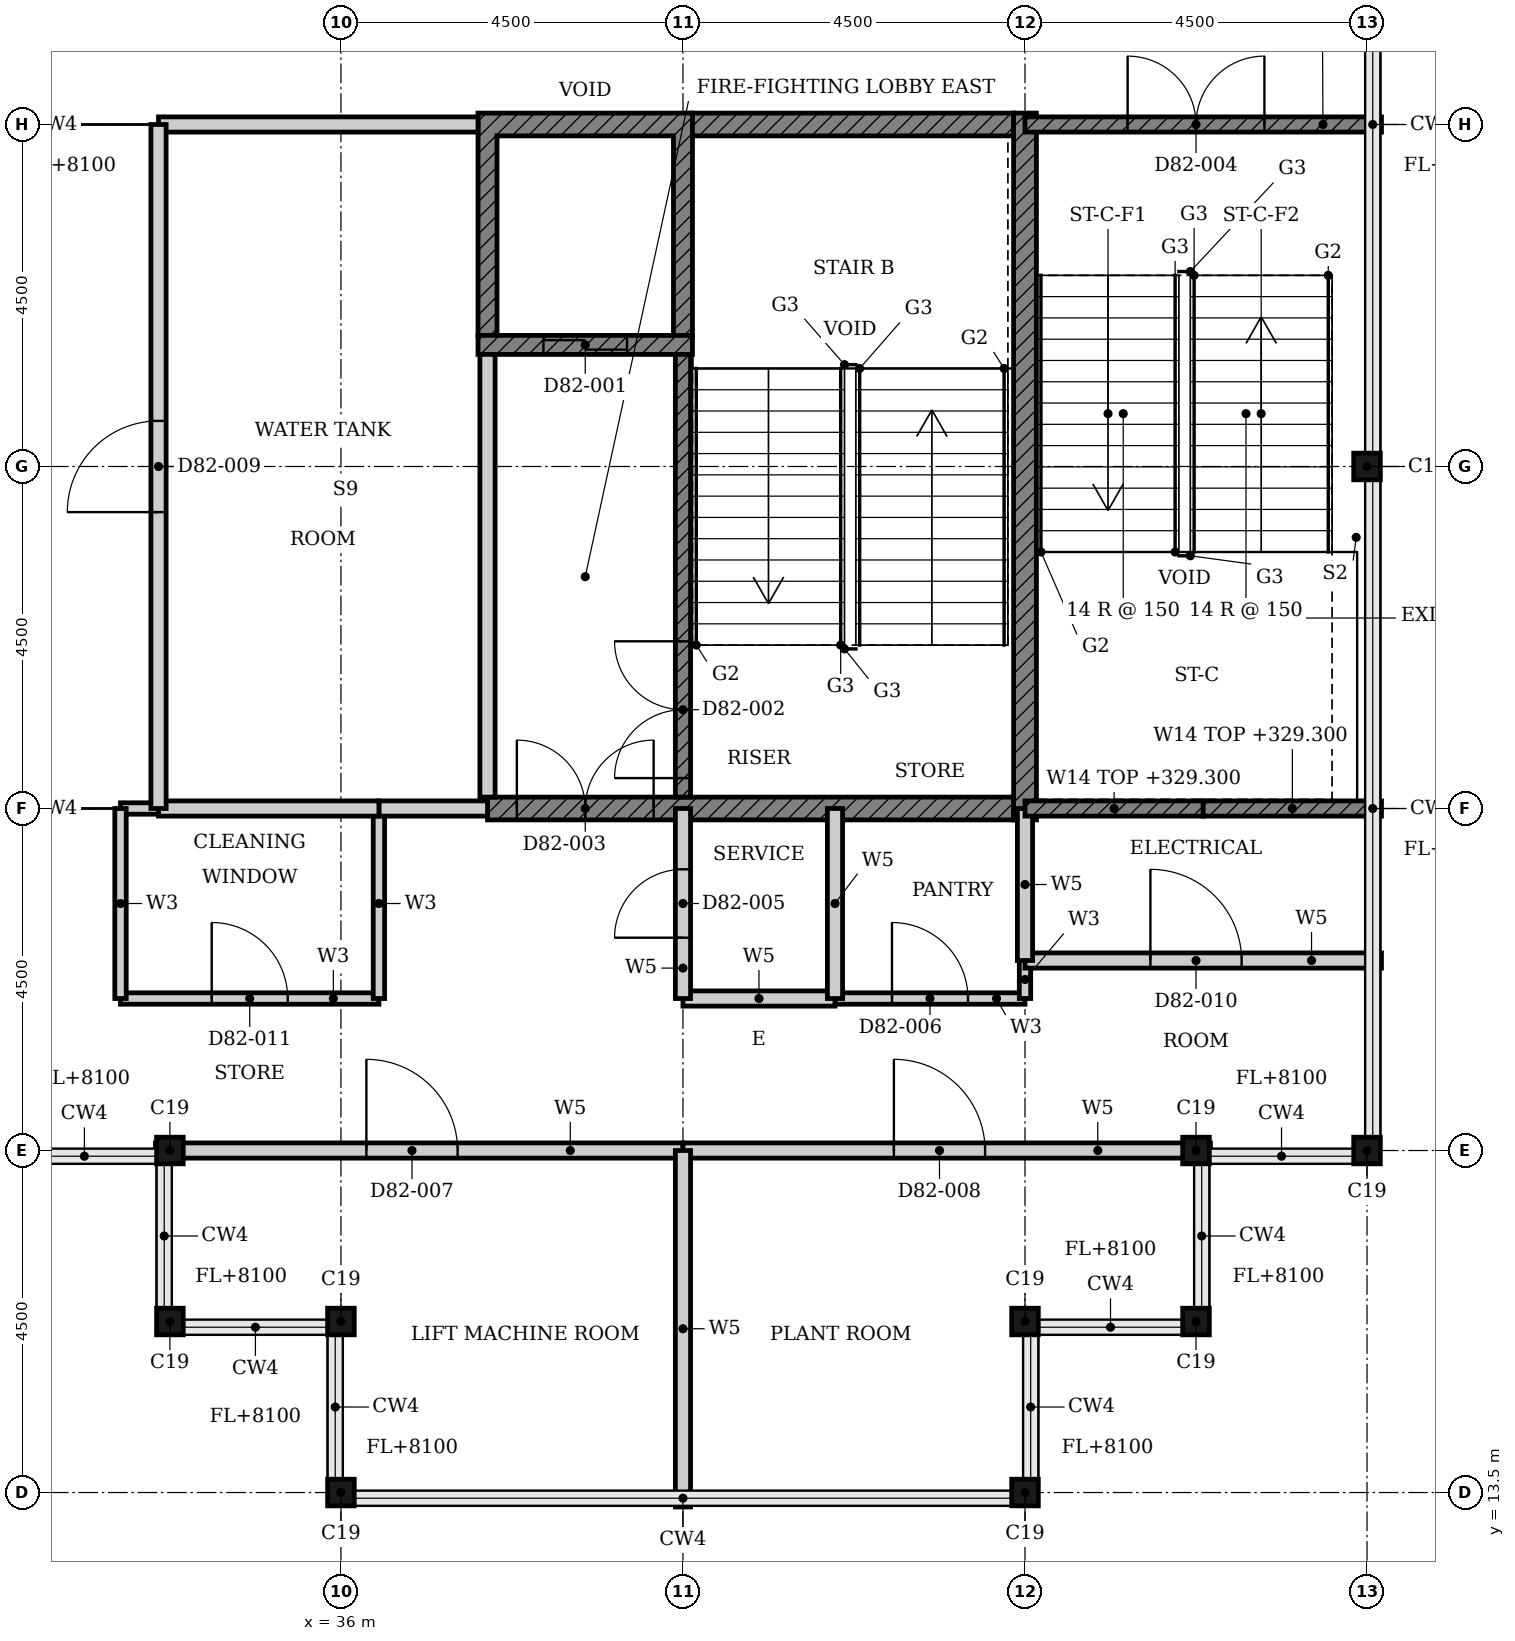
"""IFC4 building model, lengths in metres.
Left out: names, types, materials, properties, quantities, classifications, styles, units other than length and angle.
Written with IfcOpenShell. Run it as: python <this file> out.ifc"""

import sys

from ifc_helpers import new_model, si_unit, direction, frame, frame_2d, origin, origin_2d, place, context, subcontext, project, spatial, polyline, rectangle, i_section, outline, extrude, element, fill, save


model = new_model("IFC4")
c1 = context("Model", 3, precision=1e-05, world=origin(), true_north=direction((0.0, 1.0)))
c2 = subcontext(c1, "Body", "Model", "MODEL_VIEW")
j1 = project(units=[si_unit("LENGTHUNIT", "METRE"), si_unit("PLANEANGLEUNIT", "RADIAN")], contexts=[c1])
p1 = place(None, origin())
s1 = spatial("IfcSite", under=j1, at=p1, CompositionType="ELEMENT")
p2 = place(p1, origin())
s2 = spatial("IfcBuilding", under=s1, at=p2, CompositionType="ELEMENT")
p3 = place(p2, frame((0.0, 0.0, 325.4)))
s3 = spatial("IfcBuildingStorey", under=s2, at=p3, CompositionType="ELEMENT", Elevation=325.4)
for number, where, z_axis, x_axis in (
    (1, (45.0, 13.5, 0.0), (0.0, 0.0, 1.0), (1.0, 0.0, 0.0)),
    (2, (45.0, 15.75, 0.0), (0.0, 0.0, 1.0), (1.0, 0.0, 0.0)),
    (3, (47.25, 15.75, 0.0), (0.0, 0.0, 1.0), (1.0, 0.0, 0.0)),
    (4, (47.25, 18.0, 0.0), (0.0, 0.0, 1.0), (1.0, 0.0, 0.0)),
    (5, (49.5, 18.0, 0.0), (0.0, 0.0, 1.0), (1.0, 0.0, 0.0)),
    (6, (49.5, 27.0, 0.0), (0.0, 0.0, 1.0), (1.0, 0.0, 0.0)),
    (7, (33.75, 18.0, 0.0), (0.0, 0.0, 1.0), (1.0, 0.0, 0.0)),
    (8, (33.75, 15.75, 0.0), (0.0, 0.0, 1.0), (1.0, 0.0, 0.0)),
    (9, (36.0, 15.75, 0.0), (0.0, 0.0, 1.0), (1.0, 0.0, 0.0)),
    (10, (36.0, 13.5, 0.0), (0.0, 0.0, 1.0), (1.0, 0.0, 0.0)),
):
    element("IfcColumn", number, at=place(p3, frame(where, z_axis=z_axis, x_axis=x_axis)), inside=s3, PredefinedType="COLUMN", context=c2, shape_type="SweptSolid", body=[
        extrude(i_section(OverallWidth=0.35, OverallDepth=0.35, WebThickness=0.012, FlangeThickness=0.019, FilletRadius=0.013, at=origin_2d()), origin(), (0.0, 0.0, 1.0), 4.2),
    ])
p4 = place(p3, origin())
e11 = element("IfcWall", 11, at=p4, inside=s3, PredefinedType="SHEAR", context=c2, shape_type="SweptSolid", body=[
    extrude(outline(polyline([(37.803, 28.725), (38.053, 28.725), (38.053, 31.35), (40.375, 31.35), (40.375, 28.725), (40.625, 28.725), (40.625, 31.65), (37.803, 31.65), (37.803, 28.725)])), origin(), (0.0, 0.0, 1.0), 3.9),
])
p5 = place(p3, frame((37.928, 22.5, 0.0), z_axis=(0.0, 0.0, 1.0), x_axis=(1.0, 0.0, 0.0)))
e12 = element("IfcWall", 12, at=p5, inside=s3, PredefinedType="SHEAR", context=c2, shape_type="SweptSolid", body=[
    extrude(rectangle(XDim=6.922, YDim=0.3, at=frame_2d((3.461, 0.0))), origin(), (0.0, 0.0, 1.0), 3.1),
])
p6 = place(p5, frame((0.386, 0.0, 0.0)))
e13 = element("IfcOpeningElement", 13, at=p6, cuts=e12, PredefinedType="OPENING", context=c2, shape_type="SweptSolid", body=[
    extrude(rectangle(XDim=1.8, YDim=2.1, at=frame_2d((0.9, 1.05))), frame((0.0, 0.16, 0.0), z_axis=(0.0, -1.0, 0.0), x_axis=(1.0, 0.0, 0.0)), (0.0, 0.0, 1.0), 0.32),
])
p7 = place(p3, frame((40.625, 31.5, 0.0), z_axis=(0.0, 0.0, 1.0), x_axis=(1.0, 0.0, 0.0)))
e14 = element("IfcWall", 14, at=p7, inside=s3, PredefinedType="SHEAR", context=c2, shape_type="SweptSolid", body=[
    extrude(rectangle(XDim=4.225, YDim=0.3, at=frame_2d((2.113, 0.0))), origin(), (0.0, 0.0, 1.0), 3.1),
])
p8 = place(p3, frame((45.0, 22.35, 0.0), z_axis=(0.0, 0.0, 1.0), x_axis=(0.0, 1.0, 0.0)))
e15 = element("IfcWall", 15, at=p8, inside=s3, PredefinedType="SHEAR", context=c2, shape_type="SweptSolid", body=[
    extrude(rectangle(XDim=9.3, YDim=0.3, at=frame_2d((4.65, 0.0))), origin(), (0.0, 0.0, 1.0), 3.9),
])
p9 = place(p3, frame((37.803, 28.6, 0.0), z_axis=(0.0, 0.0, 1.0), x_axis=(1.0, 0.0, 0.0)))
e16 = element("IfcWall", 16, at=p9, inside=s3, PredefinedType="SHEAR", context=c2, shape_type="SweptSolid", body=[
    extrude(rectangle(XDim=2.822, YDim=0.25, at=frame_2d((1.411, 0.0))), origin(), (0.0, 0.0, 1.0), 3.9),
])
p10 = place(p9, frame((0.861, 0.0, 0.0)))
e17 = element("IfcOpeningElement", 17, at=p10, cuts=e16, PredefinedType="OPENING", context=c2, shape_type="SweptSolid", body=[
    extrude(rectangle(XDim=1.1, YDim=2.1, at=frame_2d((0.55, 1.05))), frame((0.0, 0.135, 0.0), z_axis=(0.0, -1.0, 0.0), x_axis=(1.0, 0.0, 0.0)), (0.0, 0.0, 1.0), 0.27),
])
p11 = place(p3, frame((40.5, 22.65, 0.0), z_axis=(0.0, 0.0, 1.0), x_axis=(0.0, 1.0, 0.0)))
e18 = element("IfcWall", 18, at=p11, inside=s3, PredefinedType="SHEAR", context=c2, shape_type="SweptSolid", body=[
    extrude(rectangle(XDim=5.825, YDim=0.2, at=frame_2d((2.913, 0.0))), origin(), (0.0, 0.0, 1.0), 3.9),
])
p12 = place(p11, frame((0.25, 0.0, 0.0)))
e19 = element("IfcOpeningElement", 19, at=p12, cuts=e18, PredefinedType="OPENING", context=c2, shape_type="SweptSolid", body=[
    extrude(rectangle(XDim=1.8, YDim=2.1, at=frame_2d((0.9, 1.05))), frame((0.0, 0.11, 0.0), z_axis=(0.0, -1.0, 0.0), x_axis=(1.0, 0.0, 0.0)), (0.0, 0.0, 1.0), 0.22),
])
p13 = place(p3, frame((37.928, 22.65, 0.0), z_axis=(0.0, 0.0, 1.0), x_axis=(0.0, 1.0, 0.0)))
e20 = element("IfcWall", 20, at=p13, inside=s3, PredefinedType="PARTITIONING", context=c2, shape_type="SweptSolid", body=[
    extrude(rectangle(XDim=5.825, YDim=0.2, at=frame_2d((2.913, 0.0))), origin(), (0.0, 0.0, 1.0), 3.9),
])
p14 = place(p3, frame((42.5, 20.0, 0.0), z_axis=(0.0, 0.0, 1.0), x_axis=(1.0, 0.0, 0.0)))
e21 = element("IfcWall", 21, at=p14, inside=s3, PredefinedType="PARTITIONING", context=c2, shape_type="SweptSolid", body=[
    extrude(rectangle(XDim=2.5, YDim=0.15, at=frame_2d((1.25, 0.0))), origin(), (0.0, 0.0, 1.0), 3.9),
])
p15 = place(p14, frame((0.75, 0.0, 0.0)))
e22 = element("IfcOpeningElement", 22, at=p15, cuts=e21, PredefinedType="OPENING", context=c2, shape_type="SweptSolid", body=[
    extrude(rectangle(XDim=1.0, YDim=2.1, at=frame_2d((0.5, 1.05))), frame((0.0, 0.085, 0.0), z_axis=(0.0, -1.0, 0.0), x_axis=(1.0, 0.0, 0.0)), (0.0, 0.0, 1.0), 0.17),
])
p16 = place(p3, frame((33.1, 20.0, 0.0), z_axis=(0.0, 0.0, 1.0), x_axis=(1.0, 0.0, 0.0)))
e23 = element("IfcWall", 23, at=p16, inside=s3, PredefinedType="PARTITIONING", context=c2, shape_type="SweptSolid", body=[
    extrude(rectangle(XDim=3.4, YDim=0.15, at=frame_2d((1.7, 0.0))), origin(), (0.0, 0.0, 1.0), 3.9),
])
p17 = place(p16, frame((1.2, 0.0, 0.0)))
e24 = element("IfcOpeningElement", 24, at=p17, cuts=e23, PredefinedType="OPENING", context=c2, shape_type="SweptSolid", body=[
    extrude(rectangle(XDim=1.0, YDim=2.1, at=frame_2d((0.5, 1.05))), frame((0.0, 0.085, 0.0), z_axis=(0.0, -1.0, 0.0), x_axis=(1.0, 0.0, 0.0)), (0.0, 0.0, 1.0), 0.17),
])
p18 = place(p3, frame((33.1, 22.5, 0.0), z_axis=(0.0, 0.0, 1.0), x_axis=(1.0, 0.0, 0.0)))
e25 = element("IfcWall", 25, at=p18, inside=s3, PredefinedType="PARTITIONING", context=c2, shape_type="SweptSolid", body=[
    extrude(rectangle(XDim=0.5, YDim=0.15, at=frame_2d((0.25, 0.0))), origin(), (0.0, 0.0, 1.0), 3.08),
])
for number, where, z_axis, x_axis in (
    (26, (33.1, 20.0, 0.0), (0.0, 0.0, 1.0), (0.0, 1.0, 0.0)),
    (27, (36.5, 20.0, 0.0), (0.0, 0.0, 1.0), (0.0, 1.0, 0.0)),
):
    element("IfcWall", number, at=place(p3, frame(where, z_axis=z_axis, x_axis=x_axis)), inside=s3, PredefinedType="PARTITIONING", context=c2, shape_type="SweptSolid", body=[
        extrude(rectangle(XDim=2.5, YDim=0.15, at=frame_2d((1.25, 0.0))), origin(), (0.0, 0.0, 1.0), 3.9),
    ])
p19 = place(p3, frame((45.0, 20.0, 0.0), z_axis=(0.0, 0.0, 1.0), x_axis=(0.0, 1.0, 0.0)))
e28 = element("IfcWall", 28, at=p19, inside=s3, PredefinedType="PARTITIONING", context=c2, shape_type="SweptSolid", body=[
    extrude(rectangle(XDim=0.5, YDim=0.15, at=frame_2d((0.25, 0.0))), origin(), (0.0, 0.0, 1.0), 3.9),
])
p20 = place(p3, frame((33.56, 18.0, 0.0), z_axis=(0.0, 0.0, 1.0), x_axis=(1.0, 0.0, 0.0)))
e29 = element("IfcWall", 29, at=p20, inside=s3, PredefinedType="PARTITIONING", context=c2, shape_type="SweptSolid", body=[
    extrude(rectangle(XDim=6.94, YDim=0.2, at=frame_2d((3.47, 0.0))), origin(), (0.0, 0.0, 1.0), 3.08),
])
p21 = place(p20, frame((2.775, 0.0, 0.0)))
e30 = element("IfcOpeningElement", 30, at=p21, cuts=e29, PredefinedType="OPENING", context=c2, shape_type="SweptSolid", body=[
    extrude(rectangle(XDim=1.2, YDim=2.1, at=frame_2d((0.6, 1.05))), frame((0.0, 0.11, 0.0), z_axis=(0.0, -1.0, 0.0), x_axis=(1.0, 0.0, 0.0)), (0.0, 0.0, 1.0), 0.22),
])
p22 = place(p3, frame((40.5, 18.0, 0.0), z_axis=(0.0, 0.0, 1.0), x_axis=(1.0, 0.0, 0.0)))
e31 = element("IfcWall", 31, at=p22, inside=s3, PredefinedType="PARTITIONING", context=c2, shape_type="SweptSolid", body=[
    extrude(rectangle(XDim=6.94, YDim=0.2, at=frame_2d((3.47, 0.0))), origin(), (0.0, 0.0, 1.0), 3.08),
])
p23 = place(p22, frame((2.775, 0.0, 0.0)))
e32 = element("IfcOpeningElement", 32, at=p23, cuts=e31, PredefinedType="OPENING", context=c2, shape_type="SweptSolid", body=[
    extrude(rectangle(XDim=1.2, YDim=2.1, at=frame_2d((0.6, 1.05))), frame((0.0, 0.11, 0.0), z_axis=(0.0, -1.0, 0.0), x_axis=(1.0, 0.0, 0.0)), (0.0, 0.0, 1.0), 0.22),
])
p24 = place(p3, frame((40.5, 20.0, 0.0), z_axis=(0.0, 0.0, 1.0), x_axis=(1.0, 0.0, 0.0)))
e33 = element("IfcWall", 33, at=p24, inside=s3, PredefinedType="PARTITIONING", context=c2, shape_type="SweptSolid", body=[
    extrude(rectangle(XDim=2.0, YDim=0.2, at=frame_2d((1.0, 0.0))), origin(), (0.0, 0.0, 1.0), 3.9),
])
p25 = place(p3, frame((45.0, 20.5, 0.0), z_axis=(0.0, 0.0, 1.0), x_axis=(1.0, 0.0, 0.0)))
e34 = element("IfcWall", 34, at=p25, inside=s3, PredefinedType="PARTITIONING", context=c2, shape_type="SweptSolid", body=[
    extrude(rectangle(XDim=4.69, YDim=0.2, at=frame_2d((2.345, 0.0))), origin(), (0.0, 0.0, 1.0), 3.9),
])
p26 = place(p25, frame((1.65, 0.0, 0.0)))
e35 = element("IfcOpeningElement", 35, at=p26, cuts=e34, PredefinedType="OPENING", context=c2, shape_type="SweptSolid", body=[
    extrude(rectangle(XDim=1.2, YDim=2.1, at=frame_2d((0.6, 1.05))), frame((0.0, 0.11, 0.0), z_axis=(0.0, -1.0, 0.0), x_axis=(1.0, 0.0, 0.0)), (0.0, 0.0, 1.0), 0.22),
])
p27 = place(p3, frame((36.5, 22.5, 0.0), z_axis=(0.0, 0.0, 1.0), x_axis=(1.0, 0.0, 0.0)))
e36 = element("IfcWall", 36, at=p27, inside=s3, PredefinedType="PARTITIONING", context=c2, shape_type="SweptSolid", body=[
    extrude(rectangle(XDim=1.428, YDim=0.2, at=frame_2d((0.714, 0.0))), origin(), (0.0, 0.0, 1.0), 3.08),
])
p28 = place(p3, frame((33.6, 22.5, 0.0), z_axis=(0.0, 0.0, 1.0), x_axis=(1.0, 0.0, 0.0)))
e37 = element("IfcWall", 37, at=p28, inside=s3, PredefinedType="PARTITIONING", context=c2, shape_type="SweptSolid", body=[
    extrude(rectangle(XDim=2.9, YDim=0.2, at=frame_2d((1.45, 0.0))), origin(), (0.0, 0.0, 1.0), 3.08),
])
p29 = place(p3, frame((33.6, 31.5, 0.0), z_axis=(0.0, 0.0, 1.0), x_axis=(1.0, 0.0, 0.0)))
e38 = element("IfcWall", 38, at=p29, inside=s3, PredefinedType="PARTITIONING", context=c2, shape_type="SweptSolid", body=[
    extrude(rectangle(XDim=4.203, YDim=0.2, at=frame_2d((2.102, 0.0))), origin(), (0.0, 0.0, 1.0), 3.08),
])
p30 = place(p3, frame((33.6, 22.5, 0.0), z_axis=(0.0, 0.0, 1.0), x_axis=(0.0, 1.0, 0.0)))
e39 = element("IfcWall", 39, at=p30, inside=s3, PredefinedType="PARTITIONING", context=c2, shape_type="SweptSolid", body=[
    extrude(rectangle(XDim=9.0, YDim=0.2, at=frame_2d((4.5, 0.0))), origin(), (0.0, 0.0, 1.0), 3.9),
])
p31 = place(p30, frame((3.9, 0.0, 0.0)))
e40 = element("IfcOpeningElement", 40, at=p31, cuts=e39, PredefinedType="OPENING", context=c2, shape_type="SweptSolid", body=[
    extrude(rectangle(XDim=1.2, YDim=2.1, at=frame_2d((0.6, 1.05))), frame((0.0, 0.11, 0.0), z_axis=(0.0, -1.0, 0.0), x_axis=(1.0, 0.0, 0.0)), (0.0, 0.0, 1.0), 0.22),
])
p32 = place(p3, frame((40.5, 20.0, 0.0), z_axis=(0.0, 0.0, 1.0), x_axis=(0.0, 1.0, 0.0)))
e41 = element("IfcWall", 41, at=p32, inside=s3, PredefinedType="PARTITIONING", context=c2, shape_type="SweptSolid", body=[
    extrude(rectangle(XDim=2.5, YDim=0.2, at=frame_2d((1.25, 0.0))), origin(), (0.0, 0.0, 1.0), 3.9),
])
p33 = place(p32, frame((0.8, 0.0, 0.0)))
e42 = element("IfcOpeningElement", 42, at=p33, cuts=e41, PredefinedType="OPENING", context=c2, shape_type="SweptSolid", body=[
    extrude(rectangle(XDim=0.9, YDim=2.1, at=frame_2d((0.45, 1.05))), frame((0.0, 0.11, 0.0), z_axis=(0.0, -1.0, 0.0), x_axis=(1.0, 0.0, 0.0)), (0.0, 0.0, 1.0), 0.22),
])
p34 = place(p3, frame((40.5, 13.31, 0.0), z_axis=(0.0, 0.0, 1.0), x_axis=(0.0, 1.0, 0.0)))
e43 = element("IfcWall", 43, at=p34, inside=s3, PredefinedType="PARTITIONING", context=c2, shape_type="SweptSolid", body=[
    extrude(rectangle(XDim=4.69, YDim=0.2, at=frame_2d((2.345, 0.0))), origin(), (0.0, 0.0, 1.0), 3.9),
])
p35 = place(p3, frame((42.5, 20.0, 0.0), z_axis=(0.0, 0.0, 1.0), x_axis=(0.0, 1.0, 0.0)))
e44 = element("IfcWall", 44, at=p35, inside=s3, PredefinedType="PARTITIONING", context=c2, shape_type="SweptSolid", body=[
    extrude(rectangle(XDim=2.5, YDim=0.2, at=frame_2d((1.25, 0.0))), origin(), (0.0, 0.0, 1.0), 3.9),
])
p36 = place(p3, frame((45.0, 20.5, 0.0), z_axis=(0.0, 0.0, 1.0), x_axis=(0.0, 1.0, 0.0)))
e45 = element("IfcWall", 45, at=p36, inside=s3, PredefinedType="PARTITIONING", context=c2, shape_type="SweptSolid", body=[
    extrude(rectangle(XDim=2.0, YDim=0.2, at=frame_2d((1.0, 0.0))), origin(), (0.0, 0.0, 1.0), 3.9),
])
p37 = place(p3, frame((45.0, 22.5, 0.0), z_axis=(0.0, 0.0, 1.0), x_axis=(1.0, 0.0, 0.0)))
e46 = element("IfcWall", 46, at=p37, inside=s3, PredefinedType="SHEAR", context=c2, shape_type="SweptSolid", body=[
    extrude(rectangle(XDim=2.345, YDim=0.2, at=frame_2d((1.172, 0.0))), origin(), (0.0, 0.0, 1.0), 3.9),
])
p38 = place(p3, frame((45.0, 31.5, 0.0), z_axis=(0.0, 0.0, 1.0), x_axis=(1.0, 0.0, 0.0)))
e47 = element("IfcWall", 47, at=p38, inside=s3, PredefinedType="SHEAR", context=c2, shape_type="SweptSolid", body=[
    extrude(rectangle(XDim=4.69, YDim=0.2, at=frame_2d((2.345, 0.0))), origin(), (0.0, 0.0, 1.0), 3.9),
])
p39 = place(p38, frame((1.35, 0.0, 0.0)))
e48 = element("IfcOpeningElement", 48, at=p39, cuts=e47, PredefinedType="OPENING", context=c2, shape_type="SweptSolid", body=[
    extrude(rectangle(XDim=1.8, YDim=2.1, at=frame_2d((0.9, 1.05))), frame((0.0, 0.11, 0.0), z_axis=(0.0, -1.0, 0.0), x_axis=(1.0, 0.0, 0.0)), (0.0, 0.0, 1.0), 0.22),
])
p40 = place(p3, frame((47.345, 22.5, 0.0), z_axis=(0.0, 0.0, 1.0), x_axis=(1.0, 0.0, 0.0)))
e49 = element("IfcWall", 49, at=p40, inside=s3, PredefinedType="SHEAR", context=c2, shape_type="SweptSolid", body=[
    extrude(rectangle(XDim=2.345, YDim=0.2, at=frame_2d((1.172, 0.0))), origin(), (0.0, 0.0, 1.0), 3.9),
])
p41 = place(p10, origin())
e50 = element("IfcDoor", 50, at=p41, inside=s3, OperationType="DOUBLE_DOOR_SLIDING", PredefinedType="DOOR", context=c2, shape_type="SweptSolid", body=[
    extrude(rectangle(XDim=1.1, YDim=2.1, at=frame_2d((0.55, 1.05))), frame((0.0, 0.025, 0.0), z_axis=(0.0, -1.0, 0.0), x_axis=(1.0, 0.0, 0.0)), (0.0, 0.0, 1.0), 0.05),
])
fill(e17, e50)
p42 = place(p12, origin())
e51 = element("IfcDoor", 51, at=p42, inside=s3, OperationType="DOUBLE_DOOR_SINGLE_SWING", PredefinedType="DOOR", context=c2, shape_type="SweptSolid", body=[
    extrude(rectangle(XDim=1.8, YDim=2.1, at=frame_2d((0.9, 1.05))), frame((0.0, 0.025, 0.0), z_axis=(0.0, -1.0, 0.0), x_axis=(1.0, 0.0, 0.0)), (0.0, 0.0, 1.0), 0.05),
])
fill(e19, e51)
p43 = place(p6, origin())
e52 = element("IfcDoor", 52, at=p43, inside=s3, OperationType="DOUBLE_DOOR_SINGLE_SWING", PredefinedType="DOOR", context=c2, shape_type="SweptSolid", body=[
    extrude(rectangle(XDim=1.8, YDim=2.1, at=frame_2d((0.9, 1.05))), frame((0.0, 0.025, 0.0), z_axis=(0.0, -1.0, 0.0), x_axis=(1.0, 0.0, 0.0)), (0.0, 0.0, 1.0), 0.05),
])
fill(e13, e52)
p44 = place(p39, origin())
e53 = element("IfcDoor", 53, at=p44, inside=s3, OperationType="DOUBLE_DOOR_SINGLE_SWING", PredefinedType="DOOR", context=c2, shape_type="SweptSolid", body=[
    extrude(rectangle(XDim=1.8, YDim=2.1, at=frame_2d((0.9, 1.05))), frame((0.0, 0.025, 0.0), z_axis=(0.0, -1.0, 0.0), x_axis=(1.0, 0.0, 0.0)), (0.0, 0.0, 1.0), 0.05),
])
fill(e48, e53)
p45 = place(p33, origin())
e54 = element("IfcDoor", 54, at=p45, inside=s3, OperationType="SINGLE_SWING_LEFT", PredefinedType="DOOR", context=c2, shape_type="SweptSolid", body=[
    extrude(rectangle(XDim=0.9, YDim=2.1, at=frame_2d((0.45, 1.05))), frame((0.0, 0.025, 0.0), z_axis=(0.0, -1.0, 0.0), x_axis=(1.0, 0.0, 0.0)), (0.0, 0.0, 1.0), 0.05),
])
fill(e42, e54)
p46 = place(p15, origin())
e55 = element("IfcDoor", 55, at=p46, inside=s3, OperationType="SINGLE_SWING_LEFT", PredefinedType="DOOR", context=c2, shape_type="SweptSolid", body=[
    extrude(rectangle(XDim=1.0, YDim=2.1, at=frame_2d((0.5, 1.05))), frame((0.0, 0.025, 0.0), z_axis=(0.0, -1.0, 0.0), x_axis=(1.0, 0.0, 0.0)), (0.0, 0.0, 1.0), 0.05),
])
fill(e22, e55)
p47 = place(p21, origin())
e56 = element("IfcDoor", 56, at=p47, inside=s3, OperationType="SINGLE_SWING_LEFT", PredefinedType="DOOR", context=c2, shape_type="SweptSolid", body=[
    extrude(rectangle(XDim=1.2, YDim=2.1, at=frame_2d((0.6, 1.05))), frame((0.0, 0.025, 0.0), z_axis=(0.0, -1.0, 0.0), x_axis=(1.0, 0.0, 0.0)), (0.0, 0.0, 1.0), 0.05),
])
fill(e30, e56)
p48 = place(p23, origin())
e57 = element("IfcDoor", 57, at=p48, inside=s3, OperationType="SINGLE_SWING_RIGHT", PredefinedType="DOOR", context=c2, shape_type="SweptSolid", body=[
    extrude(rectangle(XDim=1.2, YDim=2.1, at=frame_2d((0.6, 1.05))), frame((0.0, 0.025, 0.0), z_axis=(0.0, -1.0, 0.0), x_axis=(1.0, 0.0, 0.0)), (0.0, 0.0, 1.0), 0.05),
])
fill(e32, e57)
p49 = place(p31, origin())
e58 = element("IfcDoor", 58, at=p49, inside=s3, OperationType="SINGLE_SWING_LEFT", PredefinedType="DOOR", context=c2, shape_type="SweptSolid", body=[
    extrude(rectangle(XDim=1.2, YDim=2.1, at=frame_2d((0.6, 1.05))), frame((0.0, 0.025, 0.0), z_axis=(0.0, -1.0, 0.0), x_axis=(1.0, 0.0, 0.0)), (0.0, 0.0, 1.0), 0.05),
])
fill(e40, e58)
p50 = place(p26, origin())
e59 = element("IfcDoor", 59, at=p50, inside=s3, OperationType="SINGLE_SWING_RIGHT", PredefinedType="DOOR", context=c2, shape_type="SweptSolid", body=[
    extrude(rectangle(XDim=1.2, YDim=2.1, at=frame_2d((0.6, 1.05))), frame((0.0, 0.025, 0.0), z_axis=(0.0, -1.0, 0.0), x_axis=(1.0, 0.0, 0.0)), (0.0, 0.0, 1.0), 0.05),
])
fill(e35, e59)
p51 = place(p17, origin())
e60 = element("IfcDoor", 60, at=p51, inside=s3, OperationType="SINGLE_SWING_RIGHT", PredefinedType="DOOR", context=c2, shape_type="SweptSolid", body=[
    extrude(rectangle(XDim=1.0, YDim=2.1, at=frame_2d((0.5, 1.05))), frame((0.0, 0.025, 0.0), z_axis=(0.0, -1.0, 0.0), x_axis=(1.0, 0.0, 0.0)), (0.0, 0.0, 1.0), 0.05),
])
fill(e24, e60)
save(model, sys.argv[1])
